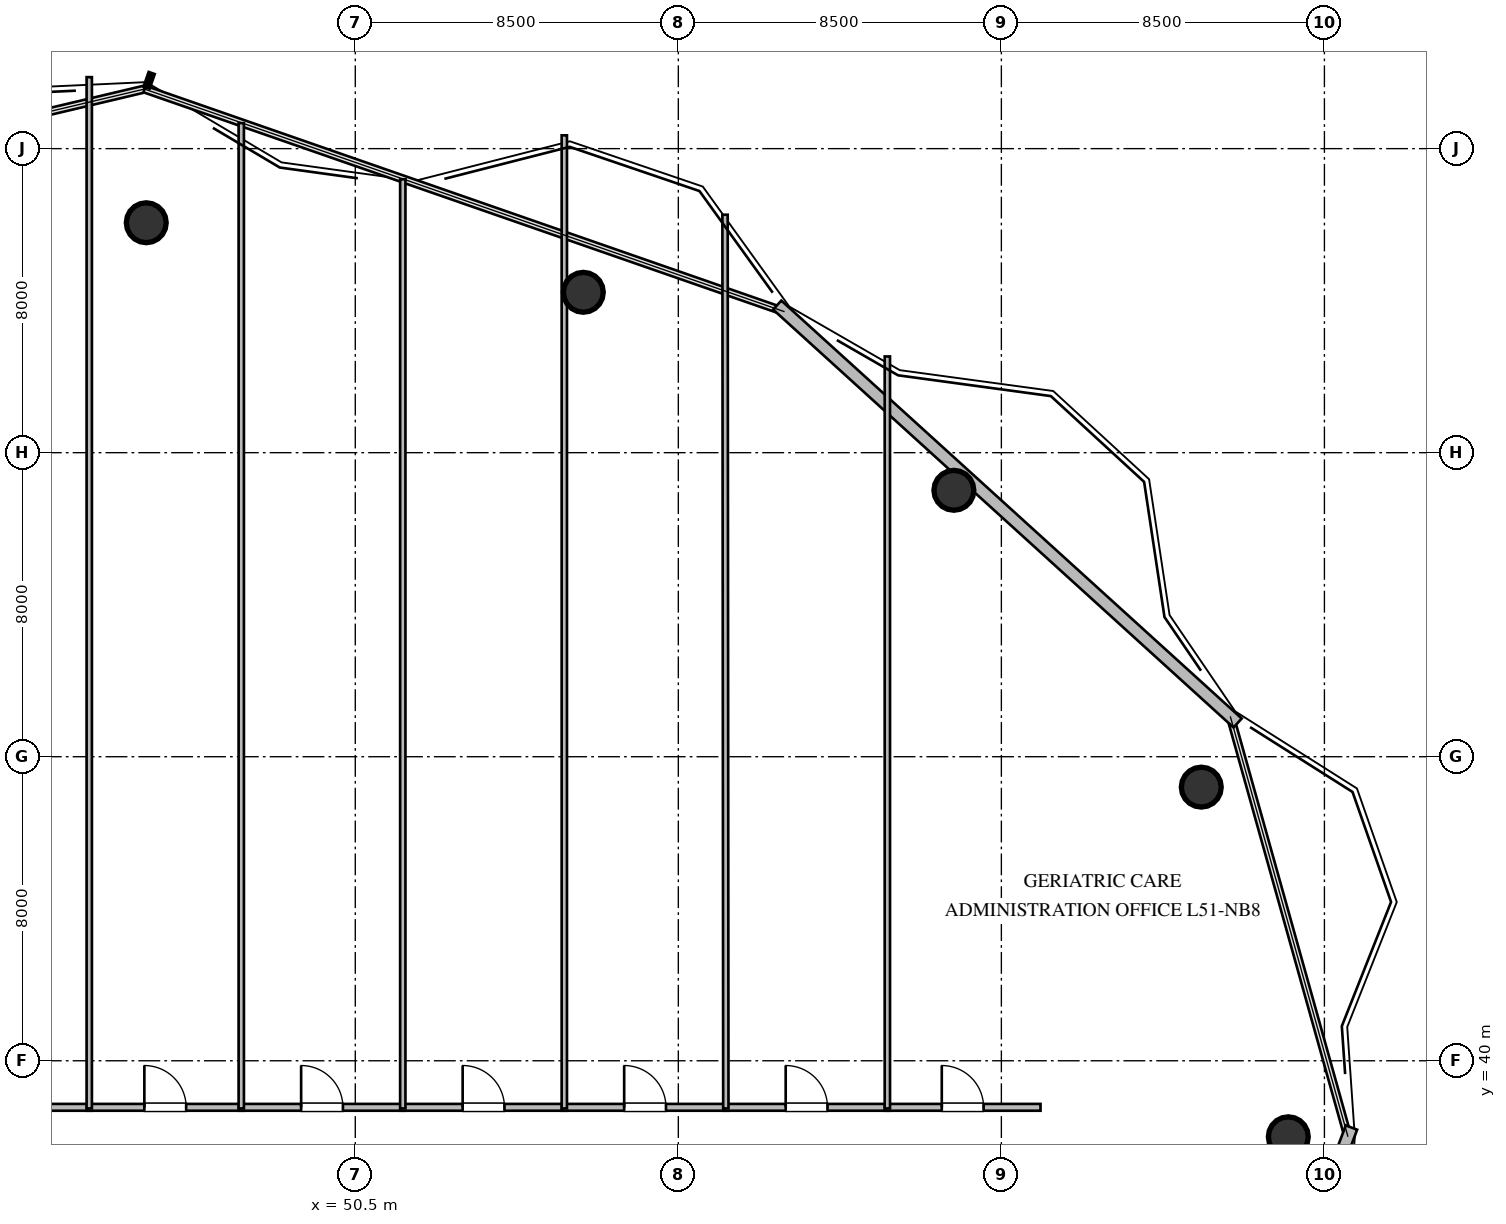
"""IFC4 building model, lengths in metres.
Left out: names, types, materials, properties, quantities, classifications, styles, units other than length and angle.
Written with IfcOpenShell. Run it as: python <this file> out.ifc"""

import sys

from ifc_helpers import new_model, si_unit, direction, frame, frame_2d, origin, origin_2d, place, context, subcontext, project, spatial, rectangle, circle, extrude, element, fill, save


model = new_model("IFC4")
c1 = context("Model", 3, precision=1e-05, world=origin(), true_north=direction((0.0, 1.0)))
c2 = subcontext(c1, "Body", "Model", "MODEL_VIEW")
j1 = project(units=[si_unit("LENGTHUNIT", "METRE"), si_unit("PLANEANGLEUNIT", "RADIAN")], contexts=[c1])
p1 = place(None, origin())
s1 = spatial("IfcSite", under=j1, at=p1, CompositionType="ELEMENT")
p2 = place(p1, origin())
s2 = spatial("IfcBuilding", under=s1, at=p2, CompositionType="ELEMENT")
p3 = place(p2, frame((0.0, 0.0, 195.6)))
s3 = spatial("IfcBuildingStorey", under=s2, at=p3, CompositionType="ELEMENT", Elevation=195.6)
for number, where, z_axis, x_axis in (
    (1, (75.05, 38.0, 0.0), (0.0, 0.0, 1.0), (1.0, 0.0, 0.0)),
    (2, (72.76, 47.2, 0.0), (0.0, 0.0, 1.0), (1.0, 0.0, 0.0)),
    (3, (66.25, 55.01, 0.0), (0.0, 0.0, 1.0), (1.0, 0.0, 0.0)),
    (4, (56.5, 60.22, 0.0), (0.0, 0.0, 1.0), (1.0, 0.0, 0.0)),
    (5, (45.0, 62.05, 0.0), (0.0, 0.0, 1.0), (1.0, 0.0, 0.0)),
):
    element("IfcColumn", number, at=place(p3, frame(where, z_axis=z_axis, x_axis=x_axis)), inside=s3, PredefinedType="COLUMN", context=c2, shape_type="SweptSolid", body=[
        extrude(circle(Radius=0.525, at=origin_2d()), origin(), (0.0, 0.0, 1.0), 3.6),
    ])
p4 = place(p3, frame((76.712, 38.243, 0.0), z_axis=(0.0, 0.0, 1.0), x_axis=(-0.353659523244, -0.935374225441, 0.0)))
e6 = element("IfcWall", 6, at=p4, inside=s3, PredefinedType="STANDARD", context=c2, shape_type="SweptSolid", body=[
    extrude(rectangle(XDim=14.172, YDim=0.32, at=frame_2d((7.086, 0.0))), origin(), (0.0, 0.0, 1.0), 3.36),
])
p5 = place(p3, frame((61.602, 59.884, 0.0), z_axis=(0.0, 0.0, 1.0), x_axis=(0.740416582554, -0.672148260638, 0.0)))
e7 = element("IfcWall", 7, at=p5, inside=s3, PredefinedType="STANDARD", context=c2, shape_type="SweptSolid", body=[
    extrude(rectangle(XDim=16.361, YDim=0.32, at=frame_2d((8.181, 0.0))), origin(), (0.0, 0.0, 1.0), 3.36),
])
p6 = place(p3, frame((39.435, 38.775, 0.0), z_axis=(0.0, 0.0, 1.0), x_axis=(1.0, 0.0, 0.0)))
e8 = element("IfcWall", 8, at=p6, inside=s3, PredefinedType="PARTITIONING", context=c2, shape_type="SweptSolid", body=[
    extrude(rectangle(XDim=4.13, YDim=0.18, at=frame_2d((2.065, 0.0))), origin(), (0.0, 0.0, 1.0), 3.36),
])
p7 = place(p6, frame((1.515, 0.0, 0.0)))
e9 = element("IfcOpeningElement", 9, at=p7, cuts=e8, PredefinedType="OPENING", context=c2, shape_type="SweptSolid", body=[
    extrude(rectangle(XDim=1.1, YDim=2.1, at=frame_2d((0.55, 1.05))), frame((0.0, 0.1, 0.0), z_axis=(0.0, -1.0, 0.0), x_axis=(1.0, 0.0, 0.0)), (0.0, 0.0, 1.0), 0.2),
])
p8 = place(p3, frame((43.435, 38.775, 0.0), z_axis=(0.0, 0.0, 1.0), x_axis=(1.0, 0.0, 0.0)))
e10 = element("IfcWall", 10, at=p8, inside=s3, PredefinedType="PARTITIONING", context=c2, shape_type="SweptSolid", body=[
    extrude(rectangle(XDim=4.13, YDim=0.18, at=frame_2d((2.065, 0.0))), origin(), (0.0, 0.0, 1.0), 3.36),
])
p9 = place(p8, frame((1.515, 0.0, 0.0)))
e11 = element("IfcOpeningElement", 11, at=p9, cuts=e10, PredefinedType="OPENING", context=c2, shape_type="SweptSolid", body=[
    extrude(rectangle(XDim=1.1, YDim=2.1, at=frame_2d((0.55, 1.05))), frame((0.0, 0.1, 0.0), z_axis=(0.0, -1.0, 0.0), x_axis=(1.0, 0.0, 0.0)), (0.0, 0.0, 1.0), 0.2),
])
p10 = place(p3, frame((47.435, 38.775, 0.0), z_axis=(0.0, 0.0, 1.0), x_axis=(1.0, 0.0, 0.0)))
e12 = element("IfcWall", 12, at=p10, inside=s3, PredefinedType="PARTITIONING", context=c2, shape_type="SweptSolid", body=[
    extrude(rectangle(XDim=4.38, YDim=0.18, at=frame_2d((2.19, 0.0))), origin(), (0.0, 0.0, 1.0), 3.36),
])
p11 = place(p10, frame((1.64, 0.0, 0.0)))
e13 = element("IfcOpeningElement", 13, at=p11, cuts=e12, PredefinedType="OPENING", context=c2, shape_type="SweptSolid", body=[
    extrude(rectangle(XDim=1.1, YDim=2.1, at=frame_2d((0.55, 1.05))), frame((0.0, 0.1, 0.0), z_axis=(0.0, -1.0, 0.0), x_axis=(1.0, 0.0, 0.0)), (0.0, 0.0, 1.0), 0.2),
])
p12 = place(p3, frame((51.685, 38.775, 0.0), z_axis=(0.0, 0.0, 1.0), x_axis=(1.0, 0.0, 0.0)))
e14 = element("IfcWall", 14, at=p12, inside=s3, PredefinedType="PARTITIONING", context=c2, shape_type="SweptSolid", body=[
    extrude(rectangle(XDim=4.38, YDim=0.18, at=frame_2d((2.19, 0.0))), origin(), (0.0, 0.0, 1.0), 3.36),
])
p13 = place(p12, frame((1.64, 0.0, 0.0)))
e15 = element("IfcOpeningElement", 15, at=p13, cuts=e14, PredefinedType="OPENING", context=c2, shape_type="SweptSolid", body=[
    extrude(rectangle(XDim=1.1, YDim=2.1, at=frame_2d((0.55, 1.05))), frame((0.0, 0.1, 0.0), z_axis=(0.0, -1.0, 0.0), x_axis=(1.0, 0.0, 0.0)), (0.0, 0.0, 1.0), 0.2),
])
p14 = place(p3, frame((55.935, 38.775, 0.0), z_axis=(0.0, 0.0, 1.0), x_axis=(1.0, 0.0, 0.0)))
e16 = element("IfcWall", 16, at=p14, inside=s3, PredefinedType="PARTITIONING", context=c2, shape_type="SweptSolid", body=[
    extrude(rectangle(XDim=4.38, YDim=0.18, at=frame_2d((2.19, 0.0))), origin(), (0.0, 0.0, 1.0), 3.36),
])
p15 = place(p14, frame((1.64, 0.0, 0.0)))
e17 = element("IfcOpeningElement", 17, at=p15, cuts=e16, PredefinedType="OPENING", context=c2, shape_type="SweptSolid", body=[
    extrude(rectangle(XDim=1.1, YDim=2.1, at=frame_2d((0.55, 1.05))), frame((0.0, 0.1, 0.0), z_axis=(0.0, -1.0, 0.0), x_axis=(1.0, 0.0, 0.0)), (0.0, 0.0, 1.0), 0.2),
])
p16 = place(p3, frame((60.185, 38.775, 0.0), z_axis=(0.0, 0.0, 1.0), x_axis=(1.0, 0.0, 0.0)))
e18 = element("IfcWall", 18, at=p16, inside=s3, PredefinedType="PARTITIONING", context=c2, shape_type="SweptSolid", body=[
    extrude(rectangle(XDim=4.38, YDim=0.18, at=frame_2d((2.19, 0.0))), origin(), (0.0, 0.0, 1.0), 3.36),
])
p17 = place(p16, frame((1.64, 0.0, 0.0)))
e19 = element("IfcOpeningElement", 19, at=p17, cuts=e18, PredefinedType="OPENING", context=c2, shape_type="SweptSolid", body=[
    extrude(rectangle(XDim=1.1, YDim=2.1, at=frame_2d((0.55, 1.05))), frame((0.0, 0.1, 0.0), z_axis=(0.0, -1.0, 0.0), x_axis=(1.0, 0.0, 0.0)), (0.0, 0.0, 1.0), 0.2),
])
p18 = place(p3, frame((64.435, 38.775, 0.0), z_axis=(0.0, 0.0, 1.0), x_axis=(1.0, 0.0, 0.0)))
e20 = element("IfcWall", 20, at=p18, inside=s3, PredefinedType="PARTITIONING", context=c2, shape_type="SweptSolid", body=[
    extrude(rectangle(XDim=4.095, YDim=0.18, at=frame_2d((2.047, 0.0))), origin(), (0.0, 0.0, 1.0), 3.36),
])
p19 = place(p18, frame((1.497, 0.0, 0.0)))
e21 = element("IfcOpeningElement", 21, at=p19, cuts=e20, PredefinedType="OPENING", context=c2, shape_type="SweptSolid", body=[
    extrude(rectangle(XDim=1.1, YDim=2.1, at=frame_2d((0.55, 1.05))), frame((0.0, 0.1, 0.0), z_axis=(0.0, -1.0, 0.0), x_axis=(1.0, 0.0, 0.0)), (0.0, 0.0, 1.0), 0.2),
])
p20 = place(p3, frame((43.5, 65.881, 0.0), z_axis=(0.0, 0.0, 1.0), x_axis=(0.0, -1.0, 0.0)))
e22 = element("IfcWall", 22, at=p20, inside=s3, PredefinedType="PARTITIONING", context=c2, shape_type="SweptSolid", body=[
    extrude(rectangle(XDim=27.136, YDim=0.14, at=frame_2d((13.568, 0.0))), origin(), (0.0, 0.0, 1.0), 2.89),
])
p21 = place(p3, frame((47.5, 64.672, 0.0), z_axis=(0.0, 0.0, 1.0), x_axis=(0.0, -1.0, 0.0)))
e23 = element("IfcWall", 23, at=p21, inside=s3, PredefinedType="PARTITIONING", context=c2, shape_type="SweptSolid", body=[
    extrude(rectangle(XDim=25.927, YDim=0.14, at=frame_2d((12.963, 0.0))), origin(), (0.0, 0.0, 1.0), 3.36),
])
p22 = place(p3, frame((51.75, 63.194, 0.0), z_axis=(0.0, 0.0, 1.0), x_axis=(0.0, -1.0, 0.0)))
e24 = element("IfcWall", 24, at=p22, inside=s3, PredefinedType="PARTITIONING", context=c2, shape_type="SweptSolid", body=[
    extrude(rectangle(XDim=24.448, YDim=0.14, at=frame_2d((12.224, 0.0))), origin(), (0.0, 0.0, 1.0), 3.36),
])
p23 = place(p3, frame((56.0, 64.35, 0.0), z_axis=(0.0, 0.0, 1.0), x_axis=(0.0, -1.0, 0.0)))
e25 = element("IfcWall", 25, at=p23, inside=s3, PredefinedType="PARTITIONING", context=c2, shape_type="SweptSolid", body=[
    extrude(rectangle(XDim=25.605, YDim=0.14, at=frame_2d((12.802, 0.0))), origin(), (0.0, 0.0, 1.0), 3.36),
])
p24 = place(p3, frame((60.229, 62.261, 0.0), z_axis=(0.0, 0.0, 1.0), x_axis=(0.000892847517, -0.999999601412, 0.0)))
e26 = element("IfcWall", 26, at=p24, inside=s3, PredefinedType="PARTITIONING", context=c2, shape_type="SweptSolid", body=[
    extrude(rectangle(XDim=23.516, YDim=0.14, at=frame_2d((11.758, 0.0))), origin(), (0.0, 0.0, 1.0), 2.996),
])
p25 = place(p3, frame((64.5, 58.532, 0.0), z_axis=(0.0, 0.0, 1.0), x_axis=(0.0, -1.0, 0.0)))
e27 = element("IfcWall", 27, at=p25, inside=s3, PredefinedType="PARTITIONING", context=c2, shape_type="SweptSolid", body=[
    extrude(rectangle(XDim=19.787, YDim=0.14, at=frame_2d((9.894, 0.0))), origin(), (0.0, 0.0, 1.0), 3.36),
])
p26 = place(p9, origin())
e28 = element("IfcDoor", 28, at=p26, inside=s3, OperationType="SINGLE_SWING_LEFT", PredefinedType="DOOR", context=c2, shape_type="SweptSolid", body=[
    extrude(rectangle(XDim=1.1, YDim=2.1, at=frame_2d((0.55, 1.05))), frame((0.0, 0.025, 0.0), z_axis=(0.0, -1.0, 0.0), x_axis=(1.0, 0.0, 0.0)), (0.0, 0.0, 1.0), 0.05),
])
fill(e11, e28)
p27 = place(p11, origin())
e29 = element("IfcDoor", 29, at=p27, inside=s3, OperationType="SINGLE_SWING_LEFT", PredefinedType="DOOR", context=c2, shape_type="SweptSolid", body=[
    extrude(rectangle(XDim=1.1, YDim=2.1, at=frame_2d((0.55, 1.05))), frame((0.0, 0.025, 0.0), z_axis=(0.0, -1.0, 0.0), x_axis=(1.0, 0.0, 0.0)), (0.0, 0.0, 1.0), 0.05),
])
fill(e13, e29)
p28 = place(p13, origin())
e30 = element("IfcDoor", 30, at=p28, inside=s3, OperationType="SINGLE_SWING_LEFT", PredefinedType="DOOR", context=c2, shape_type="SweptSolid", body=[
    extrude(rectangle(XDim=1.1, YDim=2.1, at=frame_2d((0.55, 1.05))), frame((0.0, 0.025, 0.0), z_axis=(0.0, -1.0, 0.0), x_axis=(1.0, 0.0, 0.0)), (0.0, 0.0, 1.0), 0.05),
])
fill(e15, e30)
p29 = place(p15, origin())
e31 = element("IfcDoor", 31, at=p29, inside=s3, OperationType="SINGLE_SWING_LEFT", PredefinedType="DOOR", context=c2, shape_type="SweptSolid", body=[
    extrude(rectangle(XDim=1.1, YDim=2.1, at=frame_2d((0.55, 1.05))), frame((0.0, 0.025, 0.0), z_axis=(0.0, -1.0, 0.0), x_axis=(1.0, 0.0, 0.0)), (0.0, 0.0, 1.0), 0.05),
])
fill(e17, e31)
p30 = place(p17, origin())
e32 = element("IfcDoor", 32, at=p30, inside=s3, OperationType="SINGLE_SWING_LEFT", PredefinedType="DOOR", context=c2, shape_type="SweptSolid", body=[
    extrude(rectangle(XDim=1.1, YDim=2.1, at=frame_2d((0.55, 1.05))), frame((0.0, 0.025, 0.0), z_axis=(0.0, -1.0, 0.0), x_axis=(1.0, 0.0, 0.0)), (0.0, 0.0, 1.0), 0.05),
])
fill(e19, e32)
p31 = place(p19, origin())
e33 = element("IfcDoor", 33, at=p31, inside=s3, OperationType="SINGLE_SWING_LEFT", PredefinedType="DOOR", context=c2, shape_type="SweptSolid", body=[
    extrude(rectangle(XDim=1.1, YDim=2.1, at=frame_2d((0.55, 1.05))), frame((0.0, 0.025, 0.0), z_axis=(0.0, -1.0, 0.0), x_axis=(1.0, 0.0, 0.0)), (0.0, 0.0, 1.0), 0.05),
])
fill(e21, e33)
save(model, sys.argv[1])
